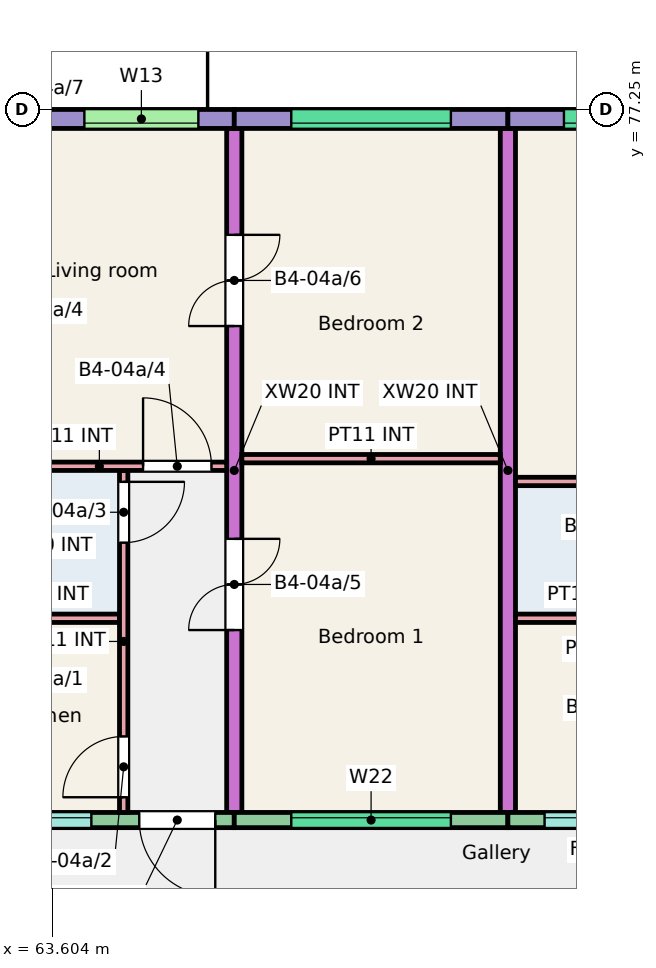
"""IFC4 building model, lengths in metres.
Left out: names, types, materials, properties, quantities, classifications, styles, units other than length and angle.
Written with IfcOpenShell. Run it as: python <this file> out.ifc"""

import sys

from ifc_helpers import new_model, si_unit, direction, frame, frame_2d, origin, place, context, subcontext, project, spatial, rectangle, extrude, element, fill, save


model = new_model("IFC4")
c1 = context("Model", 3, precision=1e-05, world=origin(), true_north=direction((0.0, 1.0)))
c2 = subcontext(c1, "Body", "Model", "MODEL_VIEW")
j1 = project(units=[si_unit("LENGTHUNIT", "METRE"), si_unit("PLANEANGLEUNIT", "RADIAN")], contexts=[c1])
p1 = place(None, origin())
s1 = spatial("IfcSite", under=j1, at=p1, CompositionType="ELEMENT")
p2 = place(p1, origin())
s2 = spatial("IfcBuilding", under=s1, at=p2, CompositionType="ELEMENT")
p3 = place(p2, frame((0.0, 0.0, 12.0)))
s3 = spatial("IfcBuildingStorey", under=s2, at=p3, CompositionType="ELEMENT", Elevation=12.0)
p4 = place(p3, frame((66.0, 68.0, 0.0), z_axis=(0.0, 0.0, 1.0), x_axis=(0.0, 1.0, 0.0)))
e1 = element("IfcWall", 1, at=p4, inside=s3, PredefinedType="SHEAR", context=c2, shape_type="SweptSolid", body=[
    extrude(rectangle(XDim=9.0, YDim=0.2, at=frame_2d((4.5, 0.0))), origin(), (0.0, 0.0, 1.0), 3.0),
])
p5 = place(p4, frame((2.4, 0.0, 0.0)))
e2 = element("IfcOpeningElement", 2, at=p5, cuts=e1, PredefinedType="OPENING", context=c2, shape_type="SweptSolid", body=[
    extrude(rectangle(XDim=1.2, YDim=2.1, at=frame_2d((0.6, 1.05))), frame((0.0, 0.11, 0.0), z_axis=(0.0, -1.0, 0.0), x_axis=(1.0, 0.0, 0.0)), (0.0, 0.0, 1.0), 0.22),
])
p6 = place(p4, frame((6.4, 0.0, 0.0)))
e3 = element("IfcOpeningElement", 3, at=p6, cuts=e1, PredefinedType="OPENING", context=c2, shape_type="SweptSolid", body=[
    extrude(rectangle(XDim=1.2, YDim=2.1, at=frame_2d((0.6, 1.05))), frame((0.0, 0.11, 0.0), z_axis=(0.0, -1.0, 0.0), x_axis=(1.0, 0.0, 0.0)), (0.0, 0.0, 1.0), 0.22),
])
p7 = place(p3, frame((69.6, 68.0, 0.0), z_axis=(0.0, 0.0, 1.0), x_axis=(0.0, 1.0, 0.0)))
e4 = element("IfcWall", 4, at=p7, inside=s3, PredefinedType="SHEAR", context=c2, shape_type="SweptSolid", body=[
    extrude(rectangle(XDim=9.0, YDim=0.2, at=frame_2d((4.5, 0.0))), origin(), (0.0, 0.0, 1.0), 3.0),
])
p8 = place(p3, frame((62.4, 77.125, 0.0), z_axis=(0.0, 0.0, 1.0), x_axis=(1.0, 0.0, 0.0)))
e5 = element("IfcWall", 5, at=p8, inside=s3, PredefinedType="SOLIDWALL", context=c2, shape_type="SweptSolid", body=[
    extrude(rectangle(XDim=3.6, YDim=0.25, at=frame_2d((1.8, 0.0))), origin(), (0.0, 0.0, 1.0), 3.0),
])
p9 = place(p8, frame((1.628, 0.0, 1.2)))
e6 = element("IfcOpeningElement", 6, at=p9, cuts=e5, PredefinedType="OPENING", context=c2, shape_type="SweptSolid", body=[
    extrude(rectangle(XDim=1.5, YDim=1.2, at=frame_2d((0.75, 0.6))), frame((0.0, 0.135, 0.0), z_axis=(0.0, -1.0, 0.0), x_axis=(1.0, 0.0, 0.0)), (0.0, 0.0, 1.0), 0.27),
])
p10 = place(p8, frame((0.156, 0.0, 0.0)))
e7 = element("IfcOpeningElement", 7, at=p10, cuts=e5, PredefinedType="OPENING", context=c2, shape_type="SweptSolid", body=[
    extrude(rectangle(XDim=1.0, YDim=2.1, at=frame_2d((0.5, 1.05))), frame((0.0, 0.135, 0.0), z_axis=(0.0, -1.0, 0.0), x_axis=(1.0, 0.0, 0.0)), (0.0, 0.0, 1.0), 0.27),
])
p11 = place(p3, frame((62.55, 67.9, 0.0), z_axis=(0.0, 0.0, 1.0), x_axis=(1.0, 0.0, 0.0)))
e8 = element("IfcWall", 8, at=p11, inside=s3, PredefinedType="SOLIDWALL", context=c2, shape_type="SweptSolid", body=[
    extrude(rectangle(XDim=3.45, YDim=0.2, at=frame_2d((1.725, 0.0))), origin(), (0.0, 0.0, 1.0), 3.0),
])
p12 = place(p11, frame((0.37, 0.0, 1.1)))
e9 = element("IfcOpeningElement", 9, at=p12, cuts=e8, PredefinedType="OPENING", context=c2, shape_type="SweptSolid", body=[
    extrude(rectangle(XDim=1.2, YDim=1.3, at=frame_2d((0.6, 0.65))), frame((0.0, 0.11, 0.0), z_axis=(0.0, -1.0, 0.0), x_axis=(1.0, 0.0, 0.0)), (0.0, 0.0, 1.0), 0.22),
])
p13 = place(p11, frame((2.2, 0.0, 0.0)))
e10 = element("IfcOpeningElement", 10, at=p13, cuts=e8, PredefinedType="OPENING", context=c2, shape_type="SweptSolid", body=[
    extrude(rectangle(XDim=1.0, YDim=2.1, at=frame_2d((0.5, 1.05))), frame((0.0, 0.11, 0.0), z_axis=(0.0, -1.0, 0.0), x_axis=(1.0, 0.0, 0.0)), (0.0, 0.0, 1.0), 0.22),
])
p14 = place(p3, frame((66.0, 77.125, 0.0), z_axis=(0.0, 0.0, 1.0), x_axis=(1.0, 0.0, 0.0)))
e11 = element("IfcWall", 11, at=p14, inside=s3, PredefinedType="SOLIDWALL", context=c2, shape_type="SweptSolid", body=[
    extrude(rectangle(XDim=3.6, YDim=0.25, at=frame_2d((1.8, 0.0))), origin(), (0.0, 0.0, 1.0), 3.0),
])
p15 = place(p14, frame((0.75, 0.0, 1.2)))
e12 = element("IfcOpeningElement", 12, at=p15, cuts=e11, PredefinedType="OPENING", context=c2, shape_type="SweptSolid", body=[
    extrude(rectangle(XDim=2.1, YDim=1.2, at=frame_2d((1.05, 0.6))), frame((0.0, 0.135, 0.0), z_axis=(0.0, -1.0, 0.0), x_axis=(1.0, 0.0, 0.0)), (0.0, 0.0, 1.0), 0.27),
])
p16 = place(p3, frame((66.0, 67.9, 0.0), z_axis=(0.0, 0.0, 1.0), x_axis=(1.0, 0.0, 0.0)))
e13 = element("IfcWall", 13, at=p16, inside=s3, PredefinedType="SOLIDWALL", context=c2, shape_type="SweptSolid", body=[
    extrude(rectangle(XDim=3.6, YDim=0.2, at=frame_2d((1.8, 0.0))), origin(), (0.0, 0.0, 1.0), 3.0),
])
p17 = place(p16, frame((0.75, 0.0, 1.2)))
e14 = element("IfcOpeningElement", 14, at=p17, cuts=e13, PredefinedType="OPENING", context=c2, shape_type="SweptSolid", body=[
    extrude(rectangle(XDim=2.1, YDim=1.2, at=frame_2d((1.05, 0.6))), frame((0.0, 0.11, 0.0), z_axis=(0.0, -1.0, 0.0), x_axis=(1.0, 0.0, 0.0)), (0.0, 0.0, 1.0), 0.22),
])
p18 = place(p3, frame((69.6, 77.125, 0.0), z_axis=(0.0, 0.0, 1.0), x_axis=(1.0, 0.0, 0.0)))
e15 = element("IfcWall", 15, at=p18, inside=s3, PredefinedType="SOLIDWALL", context=c2, shape_type="SweptSolid", body=[
    extrude(rectangle(XDim=3.6, YDim=0.25, at=frame_2d((1.8, 0.0))), origin(), (0.0, 0.0, 1.0), 3.0),
])
p19 = place(p18, frame((0.738, 0.0, 1.2)))
e16 = element("IfcOpeningElement", 16, at=p19, cuts=e15, PredefinedType="OPENING", context=c2, shape_type="SweptSolid", body=[
    extrude(rectangle(XDim=2.1, YDim=1.2, at=frame_2d((1.05, 0.6))), frame((0.0, 0.135, 0.0), z_axis=(0.0, -1.0, 0.0), x_axis=(1.0, 0.0, 0.0)), (0.0, 0.0, 1.0), 0.27),
])
p20 = place(p3, frame((69.6, 67.9, 0.0), z_axis=(0.0, 0.0, 1.0), x_axis=(1.0, 0.0, 0.0)))
e17 = element("IfcWall", 17, at=p20, inside=s3, PredefinedType="SOLIDWALL", context=c2, shape_type="SweptSolid", body=[
    extrude(rectangle(XDim=3.6, YDim=0.2, at=frame_2d((1.8, 0.0))), origin(), (0.0, 0.0, 1.0), 3.0),
])
p21 = place(p20, frame((0.482, 0.0, 1.1)))
e18 = element("IfcOpeningElement", 18, at=p21, cuts=e17, PredefinedType="OPENING", context=c2, shape_type="SweptSolid", body=[
    extrude(rectangle(XDim=1.2, YDim=1.3, at=frame_2d((0.6, 0.65))), frame((0.0, 0.11, 0.0), z_axis=(0.0, -1.0, 0.0), x_axis=(1.0, 0.0, 0.0)), (0.0, 0.0, 1.0), 0.22),
])
p22 = place(p20, frame((2.325, 0.0, 0.0)))
e19 = element("IfcOpeningElement", 19, at=p22, cuts=e17, PredefinedType="OPENING", context=c2, shape_type="SweptSolid", body=[
    extrude(rectangle(XDim=1.0, YDim=2.1, at=frame_2d((0.5, 1.05))), frame((0.0, 0.11, 0.0), z_axis=(0.0, -1.0, 0.0), x_axis=(1.0, 0.0, 0.0)), (0.0, 0.0, 1.0), 0.22),
])
p23 = place(p3, frame((62.55, 70.555, 0.0), z_axis=(0.0, 0.0, 1.0), x_axis=(1.0, 0.0, 0.0)))
e20 = element("IfcWall", 20, at=p23, inside=s3, PredefinedType="PARTITIONING", context=c2, shape_type="SweptSolid", body=[
    extrude(rectangle(XDim=1.94, YDim=0.11, at=frame_2d((0.97, 0.0))), origin(), (0.0, 0.0, 1.0), 2.8),
])
p24 = place(p3, frame((64.545, 68.0, 0.0), z_axis=(0.0, 0.0, 1.0), x_axis=(0.0, 1.0, 0.0)))
e21 = element("IfcWall", 21, at=p24, inside=s3, PredefinedType="PARTITIONING", context=c2, shape_type="SweptSolid", body=[
    extrude(rectangle(XDim=4.5, YDim=0.11, at=frame_2d((2.25, 0.0))), origin(), (0.0, 0.0, 1.0), 2.8),
])
p25 = place(p24, frame((0.2, 0.0, 0.0)))
e22 = element("IfcOpeningElement", 22, at=p25, cuts=e21, PredefinedType="OPENING", context=c2, shape_type="SweptSolid", body=[
    extrude(rectangle(XDim=0.8, YDim=2.1, at=frame_2d((0.4, 1.05))), frame((0.0, 0.065, 0.0), z_axis=(0.0, -1.0, 0.0), x_axis=(1.0, 0.0, 0.0)), (0.0, 0.0, 1.0), 0.13),
])
p26 = place(p24, frame((3.55, 0.0, 0.0)))
e23 = element("IfcOpeningElement", 23, at=p26, cuts=e21, PredefinedType="OPENING", context=c2, shape_type="SweptSolid", body=[
    extrude(rectangle(XDim=0.8, YDim=2.1, at=frame_2d((0.4, 1.05))), frame((0.0, 0.065, 0.0), z_axis=(0.0, -1.0, 0.0), x_axis=(1.0, 0.0, 0.0)), (0.0, 0.0, 1.0), 0.13),
])
p27 = place(p3, frame((62.55, 72.555, 0.0), z_axis=(0.0, 0.0, 1.0), x_axis=(1.0, 0.0, 0.0)))
e24 = element("IfcWall", 24, at=p27, inside=s3, PredefinedType="PARTITIONING", context=c2, shape_type="SweptSolid", body=[
    extrude(rectangle(XDim=3.35, YDim=0.11, at=frame_2d((1.675, 0.0))), origin(), (0.0, 0.0, 1.0), 2.8),
])
p28 = place(p27, frame((2.25, 0.0, 0.0)))
e25 = element("IfcOpeningElement", 25, at=p28, cuts=e24, PredefinedType="OPENING", context=c2, shape_type="SweptSolid", body=[
    extrude(rectangle(XDim=0.9, YDim=2.1, at=frame_2d((0.45, 1.05))), frame((0.0, 0.065, 0.0), z_axis=(0.0, -1.0, 0.0), x_axis=(1.0, 0.0, 0.0)), (0.0, 0.0, 1.0), 0.13),
])
p29 = place(p3, frame((66.1, 72.655, 0.0), z_axis=(0.0, 0.0, 1.0), x_axis=(1.0, 0.0, 0.0)))
e26 = element("IfcWall", 26, at=p29, inside=s3, PredefinedType="PARTITIONING", context=c2, shape_type="SweptSolid", body=[
    extrude(rectangle(XDim=3.4, YDim=0.11, at=frame_2d((1.7, 0.0))), origin(), (0.0, 0.0, 1.0), 2.8),
])
p30 = place(p3, frame((69.7, 70.555, 0.0), z_axis=(0.0, 0.0, 1.0), x_axis=(1.0, 0.0, 0.0)))
e27 = element("IfcWall", 27, at=p30, inside=s3, PredefinedType="PARTITIONING", context=c2, shape_type="SweptSolid", body=[
    extrude(rectangle(XDim=1.965, YDim=0.11, at=frame_2d((0.982, 0.0))), origin(), (0.0, 0.0, 1.0), 2.8),
])
p31 = place(p3, frame((69.7, 72.355, 0.0), z_axis=(0.0, 0.0, 1.0), x_axis=(1.0, 0.0, 0.0)))
e28 = element("IfcWall", 28, at=p31, inside=s3, PredefinedType="PARTITIONING", context=c2, shape_type="SweptSolid", body=[
    extrude(rectangle(XDim=3.375, YDim=0.11, at=frame_2d((1.688, 0.0))), origin(), (0.0, 0.0, 1.0), 2.8),
])
p32 = place(p31, frame((2.275, 0.0, 0.0)))
e29 = element("IfcOpeningElement", 29, at=p32, cuts=e28, PredefinedType="OPENING", context=c2, shape_type="SweptSolid", body=[
    extrude(rectangle(XDim=0.9, YDim=2.1, at=frame_2d((0.45, 1.05))), frame((0.0, 0.065, 0.0), z_axis=(0.0, -1.0, 0.0), x_axis=(1.0, 0.0, 0.0)), (0.0, 0.0, 1.0), 0.13),
])
p33 = place(p17, origin())
e30 = element("IfcWindow", 30, at=p33, inside=s3, PartitioningType="SINGLE_PANEL", PredefinedType="WINDOW", context=c2, shape_type="SweptSolid", body=[
    extrude(rectangle(XDim=2.1, YDim=1.2, at=frame_2d((1.05, 0.6))), frame((0.0, 0.06, 0.0), z_axis=(0.0, -1.0, 0.0), x_axis=(1.0, 0.0, 0.0)), (0.0, 0.0, 1.0), 0.06),
])
fill(e14, e30)
p34 = place(p15, origin())
e31 = element("IfcWindow", 31, at=p34, inside=s3, PartitioningType="SINGLE_PANEL", PredefinedType="WINDOW", context=c2, shape_type="SweptSolid", body=[
    extrude(rectangle(XDim=2.1, YDim=1.2, at=frame_2d((1.05, 0.6))), frame((0.0, -0.025, 0.0), z_axis=(0.0, -1.0, 0.0), x_axis=(1.0, 0.0, 0.0)), (0.0, 0.0, 1.0), 0.06),
])
fill(e12, e31)
p35 = place(p12, origin())
e32 = element("IfcWindow", 32, at=p35, inside=s3, PartitioningType="SINGLE_PANEL", PredefinedType="WINDOW", context=c2, shape_type="SweptSolid", body=[
    extrude(rectangle(XDim=1.2, YDim=1.3, at=frame_2d((0.6, 0.65))), frame((0.0, 0.06, 0.0), z_axis=(0.0, -1.0, 0.0), x_axis=(1.0, 0.0, 0.0)), (0.0, 0.0, 1.0), 0.06),
])
fill(e9, e32)
p36 = place(p9, origin())
e33 = element("IfcWindow", 33, at=p36, inside=s3, PartitioningType="SINGLE_PANEL", PredefinedType="WINDOW", context=c2, shape_type="SweptSolid", body=[
    extrude(rectangle(XDim=1.5, YDim=1.2, at=frame_2d((0.75, 0.6))), frame((0.0, -0.025, 0.0), z_axis=(0.0, -1.0, 0.0), x_axis=(1.0, 0.0, 0.0)), (0.0, 0.0, 1.0), 0.06),
])
fill(e6, e33)
p37 = place(p21, origin())
e34 = element("IfcWindow", 34, at=p37, inside=s3, PartitioningType="SINGLE_PANEL", PredefinedType="WINDOW", context=c2, shape_type="SweptSolid", body=[
    extrude(rectangle(XDim=1.2, YDim=1.3, at=frame_2d((0.6, 0.65))), frame((0.0, 0.06, 0.0), z_axis=(0.0, -1.0, 0.0), x_axis=(1.0, 0.0, 0.0)), (0.0, 0.0, 1.0), 0.06),
])
fill(e18, e34)
p38 = place(p19, origin())
e35 = element("IfcWindow", 35, at=p38, inside=s3, PartitioningType="SINGLE_PANEL", PredefinedType="WINDOW", context=c2, shape_type="SweptSolid", body=[
    extrude(rectangle(XDim=2.1, YDim=1.2, at=frame_2d((1.05, 0.6))), frame((0.0, -0.025, 0.0), z_axis=(0.0, -1.0, 0.0), x_axis=(1.0, 0.0, 0.0)), (0.0, 0.0, 1.0), 0.06),
])
fill(e16, e35)
p39 = place(p13, origin())
e36 = element("IfcDoor", 36, at=p39, inside=s3, OperationType="SINGLE_SWING_RIGHT", PredefinedType="DOOR", context=c2, shape_type="SweptSolid", body=[
    extrude(rectangle(XDim=1.0, YDim=2.1, at=frame_2d((0.5, 1.05))), frame((0.0, 0.025, 0.0), z_axis=(0.0, -1.0, 0.0), x_axis=(1.0, 0.0, 0.0)), (0.0, 0.0, 1.0), 0.05),
])
fill(e10, e36)
p40 = place(p25, origin())
e37 = element("IfcDoor", 37, at=p40, inside=s3, OperationType="SINGLE_SWING_LEFT", PredefinedType="DOOR", context=c2, shape_type="SweptSolid", body=[
    extrude(rectangle(XDim=0.8, YDim=2.1, at=frame_2d((0.4, 1.05))), frame((0.0, 0.025, 0.0), z_axis=(0.0, -1.0, 0.0), x_axis=(1.0, 0.0, 0.0)), (0.0, 0.0, 1.0), 0.05),
])
fill(e22, e37)
p41 = place(p26, origin())
e38 = element("IfcDoor", 38, at=p41, inside=s3, OperationType="SINGLE_SWING_RIGHT", PredefinedType="DOOR", context=c2, shape_type="SweptSolid", body=[
    extrude(rectangle(XDim=0.8, YDim=2.1, at=frame_2d((0.4, 1.05))), frame((0.0, 0.025, 0.0), z_axis=(0.0, -1.0, 0.0), x_axis=(1.0, 0.0, 0.0)), (0.0, 0.0, 1.0), 0.05),
])
fill(e23, e38)
p42 = place(p28, origin())
e39 = element("IfcDoor", 39, at=p42, inside=s3, OperationType="SINGLE_SWING_LEFT", PredefinedType="DOOR", context=c2, shape_type="SweptSolid", body=[
    extrude(rectangle(XDim=0.9, YDim=2.1, at=frame_2d((0.45, 1.05))), frame((0.0, 0.025, 0.0), z_axis=(0.0, -1.0, 0.0), x_axis=(1.0, 0.0, 0.0)), (0.0, 0.0, 1.0), 0.05),
])
fill(e25, e39)
p43 = place(p5, origin())
e40 = element("IfcDoor", 40, at=p43, inside=s3, OperationType="DOUBLE_DOOR_SINGLE_SWING", PredefinedType="DOOR", context=c2, shape_type="SweptSolid", body=[
    extrude(rectangle(XDim=1.2, YDim=2.1, at=frame_2d((0.6, 1.05))), frame((0.0, 0.025, 0.0), z_axis=(0.0, -1.0, 0.0), x_axis=(1.0, 0.0, 0.0)), (0.0, 0.0, 1.0), 0.05),
])
fill(e2, e40)
p44 = place(p6, origin())
e41 = element("IfcDoor", 41, at=p44, inside=s3, OperationType="DOUBLE_DOOR_SINGLE_SWING", PredefinedType="DOOR", context=c2, shape_type="SweptSolid", body=[
    extrude(rectangle(XDim=1.2, YDim=2.1, at=frame_2d((0.6, 1.05))), frame((0.0, 0.025, 0.0), z_axis=(0.0, -1.0, 0.0), x_axis=(1.0, 0.0, 0.0)), (0.0, 0.0, 1.0), 0.05),
])
fill(e3, e41)
save(model, sys.argv[1])
